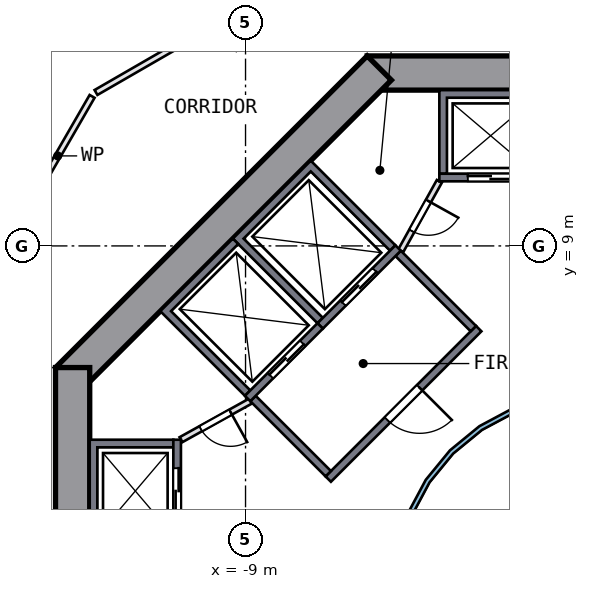
"""IFC4 building model, lengths in metres.
Left out: names, types, materials, properties, quantities, classifications, styles, units other than length and angle.
Written with IfcOpenShell. Run it as: python <this file> out.ifc"""

import sys

from ifc_helpers import new_model, si_unit, direction, frame, frame_2d, origin, place, context, subcontext, project, spatial, polyline, rectangle, outline, extrude, element, fill, save


model = new_model("IFC4")
c1 = context("Model", 3, precision=1e-05, world=origin(), true_north=direction((0.0, 1.0)))
c2 = subcontext(c1, "Body", "Model", "MODEL_VIEW")
j1 = project(units=[si_unit("LENGTHUNIT", "METRE"), si_unit("PLANEANGLEUNIT", "RADIAN")], contexts=[c1])
p1 = place(None, origin())
s1 = spatial("IfcSite", under=j1, at=p1, CompositionType="ELEMENT")
p2 = place(p1, origin())
s2 = spatial("IfcBuilding", under=s1, at=p2, CompositionType="ELEMENT")
p3 = place(p2, frame((0.0, 0.0, 14.0)))
s3 = spatial("IfcBuildingStorey", under=s2, at=p3, CompositionType="ELEMENT", Elevation=14.0)
p4 = place(p3, frame((5.799, 13.55, 0.0), z_axis=(0.0, 0.0, 1.0), x_axis=(-1.0, 0.0, 0.0)))
e1 = element("IfcWall", 1, at=p4, inside=s3, PredefinedType="SHEAR", context=c2, shape_type="SweptSolid", body=[
    extrude(rectangle(XDim=11.598, YDim=0.9, at=frame_2d((5.799, 0.0))), origin(), (0.0, 0.0, 1.0), 5.0),
])
p5 = place(p4, frame((4.899, 0.0, 0.0)))
e2 = element("IfcOpeningElement", 2, at=p5, cuts=e1, PredefinedType="OPENING", context=c2, shape_type="SweptSolid", body=[
    extrude(rectangle(XDim=1.8, YDim=2.1, at=frame_2d((0.9, 1.05))), frame((0.0, 0.46, 0.0), z_axis=(0.0, -1.0, 0.0), x_axis=(1.0, 0.0, 0.0)), (0.0, 0.0, 1.0), 0.92),
])
p6 = place(p3, frame((-5.481, 13.682, 0.0), z_axis=(0.0, 0.0, 1.0), x_axis=(-0.707106781, -0.707106781, 0.0)))
e3 = element("IfcWall", 3, at=p6, inside=s3, PredefinedType="SHEAR", context=c2, shape_type="SweptSolid", body=[
    extrude(rectangle(XDim=11.598, YDim=0.9, at=frame_2d((5.799, 0.0))), origin(), (0.0, 0.0, 1.0), 5.0),
])
p7 = place(p3, frame((-13.55, 5.799, 0.0), z_axis=(0.0, 0.0, 1.0), x_axis=(0.0, -1.0, 0.0)))
e4 = element("IfcWall", 4, at=p7, inside=s3, PredefinedType="SHEAR", context=c2, shape_type="SweptSolid", body=[
    extrude(rectangle(XDim=11.598, YDim=0.9, at=frame_2d((5.799, 0.0))), origin(), (0.0, 0.0, 1.0), 5.0),
])
p8 = place(p7, frame((4.899, 0.0, 0.0)))
e5 = element("IfcOpeningElement", 5, at=p8, cuts=e4, PredefinedType="OPENING", context=c2, shape_type="SweptSolid", body=[
    extrude(rectangle(XDim=1.8, YDim=2.1, at=frame_2d((0.9, 1.05))), frame((0.0, 0.46, 0.0), z_axis=(0.0, -1.0, 0.0), x_axis=(1.0, 0.0, 0.0)), (0.0, 0.0, 1.0), 0.92),
])
p9 = place(p3, origin())
e6 = element("IfcWall", 6, at=p9, inside=s3, PredefinedType="SOLIDWALL", context=c2, shape_type="SweptSolid", body=[
    extrude(outline(polyline([(-3.9, 10.9), (-3.9, 13.1), (-1.2, 13.1), (-1.2, 10.9), (-1.4, 10.9), (-1.4, 12.9), (-3.7, 12.9), (-3.7, 10.9), (-3.9, 10.9)])), origin(), (0.0, 0.0, 1.0), 4.55),
])
p10 = place(p3, frame((-1.2, 10.8, 0.0), z_axis=(0.0, 0.0, 1.0), x_axis=(-1.0, 0.0, 0.0)))
e7 = element("IfcWall", 7, at=p10, inside=s3, PredefinedType="SOLIDWALL", context=c2, shape_type="SweptSolid", body=[
    extrude(rectangle(XDim=2.7, YDim=0.2, at=frame_2d((1.35, 0.0))), origin(), (0.0, 0.0, 1.0), 4.55),
])
p11 = place(p10, frame((0.75, 0.0, 0.0)))
e8 = element("IfcOpeningElement", 8, at=p11, cuts=e7, PredefinedType="OPENING", context=c2, shape_type="SweptSolid", body=[
    extrude(rectangle(XDim=1.2, YDim=2.1, at=frame_2d((0.6, 1.05))), frame((0.0, 0.11, 0.0), z_axis=(0.0, -1.0, 0.0), x_axis=(1.0, 0.0, 0.0)), (0.0, 0.0, 1.0), 0.22),
])
p12 = place(p3, origin())
e9 = element("IfcWall", 9, at=p12, inside=s3, PredefinedType="SOLIDWALL", context=c2, shape_type="SweptSolid", body=[
    extrude(outline(polyline([(-13.1, 3.9), (-10.9, 3.9), (-10.9, 3.7), (-12.9, 3.7), (-12.9, 1.4), (-10.9, 1.4), (-10.9, 1.2), (-13.1, 1.2), (-13.1, 3.9)])), origin(), (0.0, 0.0, 1.0), 4.55),
])
p13 = place(p3, frame((-10.8, 1.2, 0.0), z_axis=(0.0, 0.0, 1.0), x_axis=(0.0, 1.0, 0.0)))
e10 = element("IfcWall", 10, at=p13, inside=s3, PredefinedType="SOLIDWALL", context=c2, shape_type="SweptSolid", body=[
    extrude(rectangle(XDim=2.7, YDim=0.2, at=frame_2d((1.35, 0.0))), origin(), (0.0, 0.0, 1.0), 4.55),
])
p14 = place(p13, frame((0.75, 0.0, 0.0)))
e11 = element("IfcOpeningElement", 11, at=p14, cuts=e10, PredefinedType="OPENING", context=c2, shape_type="SweptSolid", body=[
    extrude(rectangle(XDim=1.2, YDim=2.1, at=frame_2d((0.6, 1.05))), frame((0.0, 0.11, 0.0), z_axis=(0.0, -1.0, 0.0), x_axis=(1.0, 0.0, 0.0)), (0.0, 0.0, 1.0), 0.22),
])
p15 = place(p3, origin())
e12 = element("IfcWall", 12, at=p15, inside=s3, PredefinedType="SOLIDWALL", context=c2, shape_type="SweptSolid", body=[
    extrude(outline(polyline([(-9.334, 9.192), (-7.283, 11.243), (-5.056, 9.016), (-5.197, 8.874), (-7.283, 10.96), (-9.051, 9.192), (-6.965, 7.106), (-7.106, 6.965), (-9.334, 9.192)])), origin(), (0.0, 0.0, 1.0), 4.55),
])
p16 = place(p3, frame((-4.985, 8.945, 0.0), z_axis=(0.0, 0.0, 1.0), x_axis=(-0.707106781, -0.707106781, 0.0)))
e13 = element("IfcWall", 13, at=p16, inside=s3, PredefinedType="SOLIDWALL", context=c2, shape_type="SweptSolid", body=[
    extrude(rectangle(XDim=2.9, YDim=0.2, at=frame_2d((1.45, 0.0))), origin(), (0.0, 0.0, 1.0), 4.55),
])
p17 = place(p16, frame((0.85, 0.0, 0.0)))
e14 = element("IfcOpeningElement", 14, at=p17, cuts=e13, PredefinedType="OPENING", context=c2, shape_type="SweptSolid", body=[
    extrude(rectangle(XDim=1.2, YDim=2.1, at=frame_2d((0.6, 1.05))), frame((0.0, 0.11, 0.0), z_axis=(0.0, -1.0, 0.0), x_axis=(1.0, 0.0, 0.0)), (0.0, 0.0, 1.0), 0.22),
])
p18 = place(p3, origin())
e15 = element("IfcWall", 15, at=p18, inside=s3, PredefinedType="SOLIDWALL", context=c2, shape_type="SweptSolid", body=[
    extrude(outline(polyline([(-11.243, 7.283), (-9.334, 9.192), (-9.192, 9.051), (-10.96, 7.283), (-8.874, 5.197), (-9.016, 5.056), (-11.243, 7.283)])), origin(), (0.0, 0.0, 1.0), 4.55),
])
p19 = place(p3, frame((-7.036, 6.894, 0.0), z_axis=(0.0, 0.0, 1.0), x_axis=(-0.707106781, -0.707106781, 0.0)))
e16 = element("IfcWall", 16, at=p19, inside=s3, PredefinedType="SOLIDWALL", context=c2, shape_type="SweptSolid", body=[
    extrude(rectangle(XDim=2.7, YDim=0.2, at=frame_2d((1.35, 0.0))), origin(), (0.0, 0.0, 1.0), 4.55),
])
p20 = place(p19, frame((0.65, 0.0, 0.0)))
e17 = element("IfcOpeningElement", 17, at=p20, cuts=e16, PredefinedType="OPENING", context=c2, shape_type="SweptSolid", body=[
    extrude(rectangle(XDim=1.2, YDim=2.1, at=frame_2d((0.6, 1.05))), frame((0.0, 0.11, 0.0), z_axis=(0.0, -1.0, 0.0), x_axis=(1.0, 0.0, 0.0)), (0.0, 0.0, 1.0), 0.22),
])
p21 = place(p3, frame((-2.864, 6.823, 0.0), z_axis=(0.0, 0.0, 1.0), x_axis=(-0.707106781, -0.707106781, 0.0)))
e18 = element("IfcWall", 18, at=p21, inside=s3, PredefinedType="SOLIDWALL", context=c2, shape_type="SweptSolid", body=[
    extrude(rectangle(XDim=5.6, YDim=0.2, at=frame_2d((2.8, 0.0))), origin(), (0.0, 0.0, 1.0), 4.55),
])
p22 = place(p21, frame((2.2, 0.0, 0.0)))
e19 = element("IfcOpeningElement", 19, at=p22, cuts=e18, PredefinedType="OPENING", context=c2, shape_type="SweptSolid", body=[
    extrude(rectangle(XDim=1.2, YDim=2.1, at=frame_2d((0.6, 1.05))), frame((0.0, 0.11, 0.0), z_axis=(0.0, -1.0, 0.0), x_axis=(1.0, 0.0, 0.0)), (0.0, 0.0, 1.0), 0.22),
])
for number, where, z_axis, x_axis in (
    (20, (-3.005, 6.823, 0.0), (0.0, 0.0, 1.0), (-0.707, 0.707, 0.0)),
    (21, (-6.823, 3.005, 0.0), (0.0, 0.0, 1.0), (-0.707, 0.707, 0.0)),
):
    element("IfcWall", number, at=place(p3, frame(where, z_axis=z_axis, x_axis=x_axis)), inside=s3, PredefinedType="SOLIDWALL", context=c2, shape_type="SweptSolid", body=[
        extrude(rectangle(XDim=2.8, YDim=0.2, at=frame_2d((1.4, 0.0))), origin(), (0.0, 0.0, 1.0), 4.55),
    ])
p23 = place(p3, frame((-3.9, 10.7, 0.0), z_axis=(0.0, 0.0, 1.0), x_axis=(-0.485692555, -0.874129705, 0.0)))
e22 = element("IfcWall", 22, at=p23, inside=s3, PredefinedType="PARTITIONING", context=c2, shape_type="SweptSolid", body=[
    extrude(rectangle(XDim=2.089, YDim=0.15, at=frame_2d((1.044, 0.0))), origin(), (0.0, 0.0, 1.0), 4.55),
])
p24 = place(p23, frame((0.594, 0.0, 0.0)))
e23 = element("IfcOpeningElement", 23, at=p24, cuts=e22, PredefinedType="OPENING", context=c2, shape_type="SweptSolid", body=[
    extrude(rectangle(XDim=0.9, YDim=2.1, at=frame_2d((0.45, 1.05))), frame((0.0, 0.085, 0.0), z_axis=(0.0, -1.0, 0.0), x_axis=(1.0, 0.0, 0.0)), (0.0, 0.0, 1.0), 0.17),
])
p25 = place(p3, frame((-8.874, 4.914, 0.0), z_axis=(0.0, 0.0, 1.0), x_axis=(-0.874129705, -0.485692555, 0.0)))
e24 = element("IfcWall", 24, at=p25, inside=s3, PredefinedType="PARTITIONING", context=c2, shape_type="SweptSolid", body=[
    extrude(rectangle(XDim=2.089, YDim=0.15, at=frame_2d((1.044, 0.0))), origin(), (0.0, 0.0, 1.0), 4.55),
])
p26 = place(p25, frame((0.594, 0.0, 0.0)))
e25 = element("IfcOpeningElement", 25, at=p26, cuts=e24, PredefinedType="OPENING", context=c2, shape_type="SweptSolid", body=[
    extrude(rectangle(XDim=0.9, YDim=2.1, at=frame_2d((0.45, 1.05))), frame((0.0, 0.085, 0.0), z_axis=(0.0, -1.0, 0.0), x_axis=(1.0, 0.0, 0.0)), (0.0, 0.0, 1.0), 0.17),
])
p27 = place(p3, origin())
e26 = element("IfcWall", 26, at=p27, inside=s3, PredefinedType="SOLIDWALL", context=c2, shape_type="SweptSolid", body=[
    extrude(outline(polyline([(5.021, -0.999), (4.73, -1.959), (4.257, -2.844), (3.62, -3.62), (2.844, -4.257), (1.959, -4.73), (0.999, -5.021), (0.0, -5.12), (-0.999, -5.021), (-1.959, -4.73), (-2.844, -4.257), (-3.62, -3.62), (-4.257, -2.844), (-4.73, -1.959), (-5.021, -0.999), (-5.12, 0.0), (-5.021, 0.999), (-4.73, 1.959), (-4.257, 2.844), (-3.62, 3.62), (-2.844, 4.257), (-1.959, 4.73), (-0.999, 5.021), (0.0, 5.12), (0.999, 5.021), (1.959, 4.73), (2.844, 4.257), (3.62, 3.62), (4.257, 2.844), (4.73, 1.959), (5.021, 0.999), (5.12, 0.0), (5.021, -0.999)]), holes=[polyline([(4.904, 0.976), (4.619, 1.913), (4.157, 2.778), (3.535, 3.535), (2.778, 4.157), (1.913, 4.619), (0.976, 4.904), (0.0, 5.0), (-0.976, 4.904), (-1.913, 4.619), (-2.778, 4.157), (-3.535, 3.535), (-4.157, 2.778), (-4.619, 1.913), (-4.904, 0.976), (-5.0, 0.0), (-4.904, -0.976), (-4.619, -1.913), (-4.157, -2.778), (-3.535, -3.535), (-2.778, -4.157), (-1.913, -4.619), (-0.976, -4.904), (0.0, -5.0), (0.976, -4.904), (1.913, -4.619), (2.778, -4.157), (3.535, -3.535), (4.157, -2.778), (4.619, -1.913), (4.904, -0.976), (5.0, 0.0), (4.904, 0.976)])]), origin(), (0.0, 0.0, 1.0), 4.55),
])
p28 = place(p3, frame((-13.038, 12.935, 0.0), z_axis=(0.0, 0.0, 1.0), x_axis=(-0.499979668, -0.866037142, 0.0)))
e27 = element("IfcWall", 27, at=p28, inside=s3, PredefinedType="PARTITIONING", context=c2, shape_type="SweptSolid", body=[
    extrude(rectangle(XDim=9.367, YDim=0.15, at=frame_2d((4.683, 0.0))), origin(), (0.0, 0.0, 1.0), 4.55),
])
p29 = place(p28, frame((3.817, 0.0, 0.0)))
e28 = element("IfcOpeningElement", 28, at=p29, cuts=e27, PredefinedType="OPENING", context=c2, shape_type="SweptSolid", body=[
    extrude(rectangle(XDim=1.8, YDim=2.1, at=frame_2d((0.9, 1.05))), frame((0.0, 0.085, 0.0), z_axis=(0.0, -1.0, 0.0), x_axis=(1.0, 0.0, 0.0)), (0.0, 0.0, 1.0), 0.17),
])
p30 = place(p3, frame((-4.823, 17.721, 0.0), z_axis=(0.0, 0.0, 1.0), x_axis=(-0.866037142, -0.499979668, 0.0)))
e29 = element("IfcWall", 29, at=p30, inside=s3, PredefinedType="PARTITIONING", context=c2, shape_type="SweptSolid", body=[
    extrude(rectangle(XDim=9.367, YDim=0.15, at=frame_2d((4.683, 0.0))), origin(), (0.0, 0.0, 1.0), 4.55),
])
p31 = place(p30, frame((3.817, 0.0, 0.0)))
e30 = element("IfcOpeningElement", 30, at=p31, cuts=e29, PredefinedType="OPENING", context=c2, shape_type="SweptSolid", body=[
    extrude(rectangle(XDim=1.8, YDim=2.1, at=frame_2d((0.9, 1.05))), frame((0.0, 0.085, 0.0), z_axis=(0.0, -1.0, 0.0), x_axis=(1.0, 0.0, 0.0)), (0.0, 0.0, 1.0), 0.17),
])
p32 = place(p11, origin())
e31 = element("IfcDoor", 31, at=p32, inside=s3, OperationType="DOUBLE_DOOR_SLIDING", PredefinedType="DOOR", context=c2, shape_type="SweptSolid", body=[
    extrude(rectangle(XDim=1.2, YDim=2.1, at=frame_2d((0.6, 1.05))), frame((0.0, 0.025, 0.0), z_axis=(0.0, -1.0, 0.0), x_axis=(1.0, 0.0, 0.0)), (0.0, 0.0, 1.0), 0.05),
])
fill(e8, e31)
p33 = place(p14, origin())
e32 = element("IfcDoor", 32, at=p33, inside=s3, OperationType="DOUBLE_DOOR_SLIDING", PredefinedType="DOOR", context=c2, shape_type="SweptSolid", body=[
    extrude(rectangle(XDim=1.2, YDim=2.1, at=frame_2d((0.6, 1.05))), frame((0.0, 0.025, 0.0), z_axis=(0.0, -1.0, 0.0), x_axis=(1.0, 0.0, 0.0)), (0.0, 0.0, 1.0), 0.05),
])
fill(e11, e32)
p34 = place(p17, origin())
e33 = element("IfcDoor", 33, at=p34, inside=s3, OperationType="DOUBLE_DOOR_SLIDING", PredefinedType="DOOR", context=c2, shape_type="SweptSolid", body=[
    extrude(rectangle(XDim=1.2, YDim=2.1, at=frame_2d((0.6, 1.05))), frame((0.0, 0.025, 0.0), z_axis=(0.0, -1.0, 0.0), x_axis=(1.0, 0.0, 0.0)), (0.0, 0.0, 1.0), 0.05),
])
fill(e14, e33)
p35 = place(p20, origin())
e34 = element("IfcDoor", 34, at=p35, inside=s3, OperationType="DOUBLE_DOOR_SLIDING", PredefinedType="DOOR", context=c2, shape_type="SweptSolid", body=[
    extrude(rectangle(XDim=1.2, YDim=2.1, at=frame_2d((0.6, 1.05))), frame((0.0, 0.025, 0.0), z_axis=(0.0, -1.0, 0.0), x_axis=(1.0, 0.0, 0.0)), (0.0, 0.0, 1.0), 0.05),
])
fill(e17, e34)
p36 = place(p22, origin())
e35 = element("IfcDoor", 35, at=p36, inside=s3, OperationType="SINGLE_SWING_LEFT", PredefinedType="DOOR", context=c2, shape_type="SweptSolid", body=[
    extrude(rectangle(XDim=1.2, YDim=2.1, at=frame_2d((0.6, 1.05))), frame((0.0, 0.025, 0.0), z_axis=(0.0, -1.0, 0.0), x_axis=(1.0, 0.0, 0.0)), (0.0, 0.0, 1.0), 0.05),
])
fill(e19, e35)
p37 = place(p24, origin())
e36 = element("IfcDoor", 36, at=p37, inside=s3, OperationType="SINGLE_SWING_LEFT", PredefinedType="DOOR", context=c2, shape_type="SweptSolid", body=[
    extrude(rectangle(XDim=0.9, YDim=2.1, at=frame_2d((0.45, 1.05))), frame((0.0, 0.025, 0.0), z_axis=(0.0, -1.0, 0.0), x_axis=(1.0, 0.0, 0.0)), (0.0, 0.0, 1.0), 0.05),
])
fill(e23, e36)
p38 = place(p26, origin())
e37 = element("IfcDoor", 37, at=p38, inside=s3, OperationType="SINGLE_SWING_LEFT", PredefinedType="DOOR", context=c2, shape_type="SweptSolid", body=[
    extrude(rectangle(XDim=0.9, YDim=2.1, at=frame_2d((0.45, 1.05))), frame((0.0, 0.025, 0.0), z_axis=(0.0, -1.0, 0.0), x_axis=(1.0, 0.0, 0.0)), (0.0, 0.0, 1.0), 0.05),
])
fill(e25, e37)
save(model, sys.argv[1])
